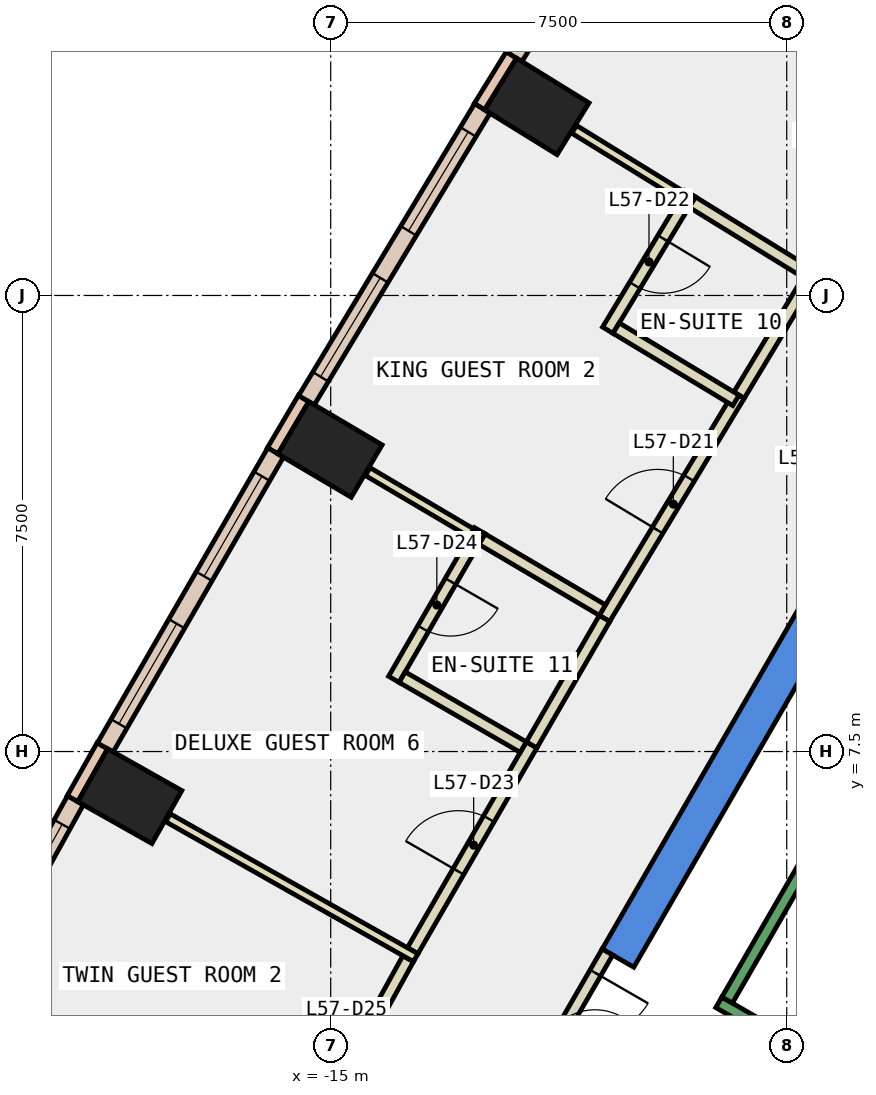
"""IFC4 building model, lengths in metres.
Left out: names, types, materials, properties, quantities, classifications, styles, units other than length and angle.
Written with IfcOpenShell. Run it as: python <this file> out.ifc"""

import sys

from ifc_helpers import new_model, si_unit, direction, frame, frame_2d, origin, origin_2d, place, context, subcontext, project, spatial, polyline, rectangle, outline, extrude, element, fill, save


model = new_model("IFC4")
c1 = context("Model", 3, precision=1e-05, world=origin(), true_north=direction((0.0, 1.0)))
c2 = subcontext(c1, "Body", "Model", "MODEL_VIEW")
j1 = project(units=[si_unit("LENGTHUNIT", "METRE"), si_unit("PLANEANGLEUNIT", "RADIAN")], contexts=[c1])
p1 = place(None, origin())
s1 = spatial("IfcSite", under=j1, at=p1, CompositionType="ELEMENT")
p2 = place(p1, origin())
s2 = spatial("IfcBuilding", under=s1, at=p2, CompositionType="ELEMENT")
p3 = place(p2, frame((0.0, 0.0, 252.2)))
s3 = spatial("IfcBuildingStorey", under=s2, at=p3, CompositionType="ELEMENT", Elevation=252.2)
for number, where, z_axis, x_axis in (
    (1, (-11.61, 18.109, -0.34), (0.0, 0.0, 1.0), (0.526, 0.851, 0.0)),
    (2, (-15.011, 12.468, -0.34), (0.0, 0.0, 1.0), (0.509, 0.861, 0.0)),
    (3, (-18.304, 6.766, -0.34), (0.0, 0.0, 1.0), (0.491, 0.871, 0.0)),
):
    element("IfcColumn", number, at=place(p3, frame(where, z_axis=z_axis, x_axis=x_axis)), inside=s3, PredefinedType="COLUMN", context=c2, shape_type="SweptSolid", body=[
        extrude(rectangle(XDim=1.0, YDim=1.4, at=origin_2d()), origin(), (0.0, 0.0, 1.0), 3.6),
    ])
p4 = place(p3, frame((0.0, 0.0, -0.34)))
e4 = element("IfcWall", 4, at=p4, inside=s3, PredefinedType="SHEAR", context=c2, shape_type="SweptSolid", body=[
    extrude(outline(polyline([(-10.535, 4.253), (-10.015, 3.953), (-5.427, 11.9), (-5.774, 12.5), (-10.535, 4.253)])), origin(), (0.0, 0.0, 1.0), 3.6),
])
p5 = place(p3, frame((-12.028, 18.955, 0.0), z_axis=(0.0, 0.0, 1.0), x_axis=(-0.525648735675, -0.850701714282, 0.0)))
e5 = element("IfcWall", 5, at=p5, inside=s3, PredefinedType="STANDARD", context=c2, shape_type="SweptSolid", body=[
    extrude(rectangle(XDim=1.0, YDim=0.2, at=frame_2d((0.5, 0.0))), origin(), (0.0, 0.0, 1.0), 3.26),
])
p6 = place(p3, frame((-15.446, 13.306, 0.0), z_axis=(0.0, 0.0, 1.0), x_axis=(-0.508268432768, -0.861198699634, 0.0)))
e6 = element("IfcWall", 6, at=p6, inside=s3, PredefinedType="STANDARD", context=c2, shape_type="SweptSolid", body=[
    extrude(rectangle(XDim=1.0, YDim=0.2, at=frame_2d((0.5, 0.0))), origin(), (0.0, 0.0, 1.0), 3.26),
])
p7 = place(p3, frame((-18.755, 7.594, 0.0), z_axis=(0.0, 0.0, 1.0), x_axis=(-0.491928603027, -0.870635543453, 0.0)))
e7 = element("IfcWall", 7, at=p7, inside=s3, PredefinedType="STANDARD", context=c2, shape_type="SweptSolid", body=[
    extrude(rectangle(XDim=1.0, YDim=0.2, at=frame_2d((0.5, 0.0))), origin(), (0.0, 0.0, 1.0), 3.26),
])
p8 = place(p3, frame((-8.981, 23.697, 0.0), z_axis=(0.0, 0.0, 1.0), x_axis=(-0.532558226688, -0.846393369059, 0.0)))
e8 = element("IfcWall", 8, at=p8, inside=s3, PredefinedType="STANDARD", context=c2, shape_type="SweptSolid", body=[
    extrude(rectangle(XDim=5.637, YDim=0.3, at=frame_2d((2.818, 0.0))), origin(), (0.0, 0.0, 1.0), 3.26),
])
p9 = place(p8, frame((0.459, 0.0, 0.9)))
e9 = element("IfcOpeningElement", 9, at=p9, cuts=e8, PredefinedType="OPENING", context=c2, shape_type="SweptSolid", body=[
    extrude(rectangle(XDim=1.9, YDim=2.0, at=frame_2d((0.95, 1.0))), frame((0.0, 0.16, 0.0), z_axis=(0.0, -1.0, 0.0), x_axis=(1.0, 0.0, 0.0)), (0.0, 0.0, 1.0), 0.32),
])
p10 = place(p8, frame((3.278, 0.0, 0.9)))
e10 = element("IfcOpeningElement", 10, at=p10, cuts=e8, PredefinedType="OPENING", context=c2, shape_type="SweptSolid", body=[
    extrude(rectangle(XDim=1.9, YDim=2.0, at=frame_2d((0.95, 1.0))), frame((0.0, 0.16, 0.0), z_axis=(0.0, -1.0, 0.0), x_axis=(1.0, 0.0, 0.0)), (0.0, 0.0, 1.0), 0.32),
])
p11 = place(p3, frame((-12.506, 18.076, 0.0), z_axis=(0.0, 0.0, 1.0), x_axis=(-0.516269519619, -0.856426169096, 0.0)))
e11 = element("IfcWall", 11, at=p11, inside=s3, PredefinedType="STANDARD", context=c2, shape_type="SweptSolid", body=[
    extrude(rectangle(XDim=5.603, YDim=0.3, at=frame_2d((2.802, 0.0))), origin(), (0.0, 0.0, 1.0), 3.26),
])
p12 = place(p11, frame((0.451, 0.0, 0.9)))
e12 = element("IfcOpeningElement", 12, at=p12, cuts=e11, PredefinedType="OPENING", context=c2, shape_type="SweptSolid", body=[
    extrude(rectangle(XDim=1.9, YDim=2.0, at=frame_2d((0.95, 1.0))), frame((0.0, 0.16, 0.0), z_axis=(0.0, -1.0, 0.0), x_axis=(1.0, 0.0, 0.0)), (0.0, 0.0, 1.0), 0.32),
])
p13 = place(p11, frame((3.253, 0.0, 0.9)))
e13 = element("IfcOpeningElement", 13, at=p13, cuts=e11, PredefinedType="OPENING", context=c2, shape_type="SweptSolid", body=[
    extrude(rectangle(XDim=1.9, YDim=2.0, at=frame_2d((0.95, 1.0))), frame((0.0, 0.16, 0.0), z_axis=(0.0, -1.0, 0.0), x_axis=(1.0, 0.0, 0.0)), (0.0, 0.0, 1.0), 0.32),
])
p14 = place(p3, frame((-15.906, 12.418, 0.0), z_axis=(0.0, 0.0, 1.0), x_axis=(-0.500089564757, -0.865973687372, 0.0)))
e14 = element("IfcWall", 14, at=p14, inside=s3, PredefinedType="STANDARD", context=c2, shape_type="SweptSolid", body=[
    extrude(rectangle(XDim=5.603, YDim=0.3, at=frame_2d((2.802, 0.0))), origin(), (0.0, 0.0, 1.0), 3.26),
])
p15 = place(p14, frame((0.451, 0.0, 0.9)))
e15 = element("IfcOpeningElement", 15, at=p15, cuts=e14, PredefinedType="OPENING", context=c2, shape_type="SweptSolid", body=[
    extrude(rectangle(XDim=1.9, YDim=2.0, at=frame_2d((0.95, 1.0))), frame((0.0, 0.16, 0.0), z_axis=(0.0, -1.0, 0.0), x_axis=(1.0, 0.0, 0.0)), (0.0, 0.0, 1.0), 0.32),
])
p16 = place(p14, frame((3.252, 0.0, 0.9)))
e16 = element("IfcOpeningElement", 16, at=p16, cuts=e14, PredefinedType="OPENING", context=c2, shape_type="SweptSolid", body=[
    extrude(rectangle(XDim=1.9, YDim=2.0, at=frame_2d((0.95, 1.0))), frame((0.0, 0.16, 0.0), z_axis=(0.0, -1.0, 0.0), x_axis=(1.0, 0.0, 0.0)), (0.0, 0.0, 1.0), 0.32),
])
p17 = place(p3, frame((-19.199, 6.697, 0.0), z_axis=(0.0, 0.0, 1.0), x_axis=(-0.483469062695, -0.875361448441, 0.0)))
e17 = element("IfcWall", 17, at=p17, inside=s3, PredefinedType="STANDARD", context=c2, shape_type="SweptSolid", body=[
    extrude(rectangle(XDim=5.601, YDim=0.3, at=frame_2d((2.801, 0.0))), origin(), (0.0, 0.0, 1.0), 3.26),
])
p18 = place(p17, frame((0.45, 0.0, 0.9)))
e18 = element("IfcOpeningElement", 18, at=p18, cuts=e17, PredefinedType="OPENING", context=c2, shape_type="SweptSolid", body=[
    extrude(rectangle(XDim=1.9, YDim=2.0, at=frame_2d((0.95, 1.0))), frame((0.0, 0.16, 0.0), z_axis=(0.0, -1.0, 0.0), x_axis=(1.0, 0.0, 0.0)), (0.0, 0.0, 1.0), 0.32),
])
p19 = place(p17, frame((3.251, 0.0, 0.9)))
e19 = element("IfcOpeningElement", 19, at=p19, cuts=e17, PredefinedType="OPENING", context=c2, shape_type="SweptSolid", body=[
    extrude(rectangle(XDim=1.9, YDim=2.0, at=frame_2d((0.95, 1.0))), frame((0.0, 0.16, 0.0), z_axis=(0.0, -1.0, 0.0), x_axis=(1.0, 0.0, 0.0)), (0.0, 0.0, 1.0), 0.32),
])
p20 = place(p3, frame((-10.498, 9.689, 0.0), z_axis=(0.0, 0.0, 1.0), x_axis=(0.516353342298, 0.856375633643, 0.0)))
e20 = element("IfcWall", 20, at=p20, inside=s3, PredefinedType="PARTITIONING", context=c2, shape_type="SweptSolid", body=[
    extrude(rectangle(XDim=4.288, YDim=0.2, at=frame_2d((2.144, 0.0))), origin(), (0.0, 0.0, 1.0), 3.26),
])
p21 = place(p20, frame((1.694, 0.0, 0.0)))
e21 = element("IfcOpeningElement", 21, at=p21, cuts=e20, PredefinedType="OPENING", context=c2, shape_type="SweptSolid", body=[
    extrude(rectangle(XDim=1.0, YDim=2.1, at=frame_2d((0.5, 1.05))), frame((0.0, 0.11, 0.0), z_axis=(0.0, -1.0, 0.0), x_axis=(1.0, 0.0, 0.0)), (0.0, 0.0, 1.0), 0.22),
])
p22 = place(p3, frame((-8.284, 13.361, 0.0), z_axis=(0.0, 0.0, 1.0), x_axis=(0.516354965559, 0.856374654893, 0.0)))
e22 = element("IfcWall", 22, at=p22, inside=s3, PredefinedType="PARTITIONING", context=c2, shape_type="SweptSolid", body=[
    extrude(rectangle(XDim=2.2, YDim=0.2, at=frame_2d((1.1, 0.0))), origin(), (0.0, 0.0, 1.0), 3.26),
])
p23 = place(p3, frame((-13.652, 4.224, 0.0), z_axis=(0.0, 0.0, 1.0), x_axis=(0.500221427001, 0.865897525097, 0.0)))
e23 = element("IfcWall", 23, at=p23, inside=s3, PredefinedType="PARTITIONING", context=c2, shape_type="SweptSolid", body=[
    extrude(rectangle(XDim=3.91, YDim=0.2, at=frame_2d((1.955, 0.0))), origin(), (0.0, 0.0, 1.0), 3.26),
])
p24 = place(p23, frame((1.505, 0.0, 0.0)))
e24 = element("IfcOpeningElement", 24, at=p24, cuts=e23, PredefinedType="OPENING", context=c2, shape_type="SweptSolid", body=[
    extrude(rectangle(XDim=1.0, YDim=2.1, at=frame_2d((0.5, 1.05))), frame((0.0, 0.11, 0.0), z_axis=(0.0, -1.0, 0.0), x_axis=(1.0, 0.0, 0.0)), (0.0, 0.0, 1.0), 0.22),
])
p25 = place(p3, frame((-11.696, 7.61, 0.0), z_axis=(0.0, 0.0, 1.0), x_axis=(0.500089422704, 0.865973769406, 0.0)))
e25 = element("IfcWall", 25, at=p25, inside=s3, PredefinedType="PARTITIONING", context=c2, shape_type="SweptSolid", body=[
    extrude(rectangle(XDim=2.399, YDim=0.2, at=frame_2d((1.2, 0.0))), origin(), (0.0, 0.0, 1.0), 3.26),
])
p26 = place(p3, frame((-15.809, 0.32, 0.0), z_axis=(0.0, 0.0, 1.0), x_axis=(0.483322920175, 0.875442148193, 0.0)))
e26 = element("IfcWall", 26, at=p26, inside=s3, PredefinedType="PARTITIONING", context=c2, shape_type="SweptSolid", body=[
    extrude(rectangle(XDim=4.31, YDim=0.2, at=frame_2d((2.155, 0.0))), origin(), (0.0, 0.0, 1.0), 3.26),
])
p27 = place(p26, frame((1.705, 0.0, 0.0)))
e27 = element("IfcOpeningElement", 27, at=p27, cuts=e26, PredefinedType="OPENING", context=c2, shape_type="SweptSolid", body=[
    extrude(rectangle(XDim=1.0, YDim=2.1, at=frame_2d((0.5, 1.05))), frame((0.0, 0.11, 0.0), z_axis=(0.0, -1.0, 0.0), x_axis=(1.0, 0.0, 0.0)), (0.0, 0.0, 1.0), 0.22),
])
p28 = place(p3, frame((-7.357, 19.423, 0.0), z_axis=(0.0, 0.0, 1.0), x_axis=(0.846270070045, -0.532754135176, 0.0)))
e28 = element("IfcWall", 28, at=p28, inside=s3, PredefinedType="PARTITIONING", context=c2, shape_type="SweptSolid", body=[
    extrude(rectangle(XDim=2.3, YDim=0.2, at=frame_2d((1.15, 0.0))), origin(), (0.0, 0.0, 1.0), 3.26),
])
p29 = place(p3, frame((-9.225, 16.641, 0.0), z_axis=(0.0, 0.0, 1.0), x_axis=(-0.85144868382, 0.524437926566, 0.0)))
e29 = element("IfcWall", 29, at=p29, inside=s3, PredefinedType="PARTITIONING", context=c2, shape_type="SweptSolid", body=[
    extrude(rectangle(XDim=2.08, YDim=0.15, at=frame_2d((1.04, 0.0))), origin(), (0.0, 0.0, 1.0), 3.26),
])
p30 = place(p3, frame((-7.182, 15.383, 0.0), z_axis=(0.0, 0.0, 1.0), x_axis=(-0.851498142432, 0.524357619792, 0.0)))
e30 = element("IfcWall", 30, at=p30, inside=s3, PredefinedType="PARTITIONING", context=c2, shape_type="SweptSolid", body=[
    extrude(rectangle(XDim=2.198, YDim=0.2, at=frame_2d((1.099, 0.0))), origin(), (0.0, 0.0, 1.0), 3.26),
])
p31 = place(p3, frame((-9.088, 16.674, 0.0), z_axis=(0.0, 0.0, 1.0), x_axis=(-0.516780274192, -0.856118069081, 0.0)))
e31 = element("IfcWall", 31, at=p31, inside=s3, PredefinedType="PARTITIONING", context=c2, shape_type="SweptSolid", body=[
    extrude(rectangle(XDim=2.623, YDim=0.2, at=frame_2d((1.311, 0.0))), origin(), (0.0, 0.0, 1.0), 3.26),
])
p32 = place(p31, frame((0.861, 0.0, 0.0)))
e32 = element("IfcOpeningElement", 32, at=p32, cuts=e31, PredefinedType="OPENING", context=c2, shape_type="SweptSolid", body=[
    extrude(rectangle(XDim=0.9, YDim=2.1, at=frame_2d((0.45, 1.05))), frame((0.0, 0.11, 0.0), z_axis=(0.0, -1.0, 0.0), x_axis=(1.0, 0.0, 0.0)), (0.0, 0.0, 1.0), 0.22),
])
p33 = place(p3, frame((-10.306, 14.463, 0.0), z_axis=(0.0, 0.0, 1.0), x_axis=(0.856338986581, -0.51641411683, 0.0)))
e33 = element("IfcWall", 33, at=p33, inside=s3, PredefinedType="PARTITIONING", context=c2, shape_type="SweptSolid", body=[
    extrude(rectangle(XDim=2.301, YDim=0.2, at=frame_2d((1.15, 0.0))), origin(), (0.0, 0.0, 1.0), 3.26),
])
p34 = place(p3, frame((-12.685, 11.096, 0.0), z_axis=(0.0, 0.0, 1.0), x_axis=(-0.861157054724, 0.508338988371, 0.0)))
e34 = element("IfcWall", 34, at=p34, inside=s3, PredefinedType="PARTITIONING", context=c2, shape_type="SweptSolid", body=[
    extrude(rectangle(XDim=1.981, YDim=0.15, at=frame_2d((0.991, 0.0))), origin(), (0.0, 0.0, 1.0), 3.26),
])
p35 = place(p3, frame((-10.532, 9.826, 0.0), z_axis=(0.0, 0.0, 1.0), x_axis=(-0.861311086958, 0.508077958077, 0.0)))
e35 = element("IfcWall", 35, at=p35, inside=s3, PredefinedType="PARTITIONING", context=c2, shape_type="SweptSolid", body=[
    extrude(rectangle(XDim=2.299, YDim=0.2, at=frame_2d((1.149, 0.0))), origin(), (0.0, 0.0, 1.0), 3.26),
])
p36 = place(p3, frame((-12.548, 11.132, 0.0), z_axis=(0.0, 0.0, 1.0), x_axis=(-0.500313606915, -0.865844267022, 0.0)))
e36 = element("IfcWall", 36, at=p36, inside=s3, PredefinedType="PARTITIONING", context=c2, shape_type="SweptSolid", body=[
    extrude(rectangle(XDim=2.824, YDim=0.2, at=frame_2d((1.412, 0.0))), origin(), (0.0, 0.0, 1.0), 3.26),
])
p37 = place(p36, frame((0.962, 0.0, 0.0)))
e37 = element("IfcOpeningElement", 37, at=p37, cuts=e36, PredefinedType="OPENING", context=c2, shape_type="SweptSolid", body=[
    extrude(rectangle(XDim=0.9, YDim=2.1, at=frame_2d((0.45, 1.05))), frame((0.0, 0.11, 0.0), z_axis=(0.0, -1.0, 0.0), x_axis=(1.0, 0.0, 0.0)), (0.0, 0.0, 1.0), 0.22),
])
p38 = place(p3, frame((-13.825, 8.723, 0.0), z_axis=(0.0, 0.0, 1.0), x_axis=(0.866053019151, -0.499952165731, 0.0)))
e38 = element("IfcWall", 38, at=p38, inside=s3, PredefinedType="PARTITIONING", context=c2, shape_type="SweptSolid", body=[
    extrude(rectangle(XDim=2.3, YDim=0.2, at=frame_2d((1.15, 0.0))), origin(), (0.0, 0.0, 1.0), 3.26),
])
p39 = place(p3, frame((-13.602, 4.11, 0.0), z_axis=(0.0, 0.0, 1.0), x_axis=(-0.870787203306, 0.491660092502, 0.0)))
e39 = element("IfcWall", 39, at=p39, inside=s3, PredefinedType="PARTITIONING", context=c2, shape_type="SweptSolid", body=[
    extrude(rectangle(XDim=4.68, YDim=0.15, at=frame_2d((2.34, 0.0))), origin(), (0.0, 0.0, 1.0), 3.26),
])
p40 = place(p3, frame((-10.449, 4.203, 0.0), z_axis=(0.0, 0.0, 1.0), x_axis=(-0.499914839587, -0.866074565589, 0.0)))
e40 = element("IfcWall", 40, at=p40, inside=s3, PredefinedType="PARTITIONING", context=c2, shape_type="SweptSolid", body=[
    extrude(rectangle(XDim=1.794, YDim=0.2, at=frame_2d((0.897, 0.0))), origin(), (0.0, 0.0, 1.0), 2.4),
])
p41 = place(p40, frame((0.397, 0.0, 0.0)))
e41 = element("IfcOpeningElement", 41, at=p41, cuts=e40, PredefinedType="OPENING", context=c2, shape_type="SweptSolid", body=[
    extrude(rectangle(XDim=1.0, YDim=2.1, at=frame_2d((0.5, 1.05))), frame((0.0, 0.11, 0.0), z_axis=(0.0, -1.0, 0.0), x_axis=(1.0, 0.0, 0.0)), (0.0, 0.0, 1.0), 0.22),
])
p42 = place(p3, frame((-6.25, 2.01, 0.0), z_axis=(0.0, 0.0, 1.0), x_axis=(-0.86611865017, 0.499838457731, 0.0)))
e42 = element("IfcWall", 42, at=p42, inside=s3, PredefinedType="STANDARD", context=c2, shape_type="SweptSolid", body=[
    extrude(rectangle(XDim=2.733, YDim=0.2, at=frame_2d((1.366, 0.0))), origin(), (0.0, 0.0, 1.0), 3.26),
])
p43 = place(p3, frame((-5.03, 9.388, 0.0), z_axis=(0.0, 0.0, 1.0), x_axis=(-0.499978703459, -0.866037698999, 0.0)))
e43 = element("IfcWall", 43, at=p43, inside=s3, PredefinedType="STANDARD", context=c2, shape_type="SweptSolid", body=[
    extrude(rectangle(XDim=6.9, YDim=0.2, at=frame_2d((3.45, 0.0))), origin(), (0.0, 0.0, 1.0), 3.26),
])
p44 = place(p12, origin())
e44 = element("IfcWindow", 44, at=p44, inside=s3, PartitioningType="SINGLE_PANEL", PredefinedType="WINDOW", context=c2, shape_type="SweptSolid", body=[
    extrude(rectangle(XDim=1.9, YDim=2.0, at=frame_2d((0.95, 1.0))), frame((0.0, 0.03, 0.0), z_axis=(0.0, -1.0, 0.0), x_axis=(1.0, 0.0, 0.0)), (0.0, 0.0, 1.0), 0.06),
])
fill(e12, e44)
p45 = place(p13, origin())
e45 = element("IfcWindow", 45, at=p45, inside=s3, PartitioningType="SINGLE_PANEL", PredefinedType="WINDOW", context=c2, shape_type="SweptSolid", body=[
    extrude(rectangle(XDim=1.9, YDim=2.0, at=frame_2d((0.95, 1.0))), frame((0.0, 0.03, 0.0), z_axis=(0.0, -1.0, 0.0), x_axis=(1.0, 0.0, 0.0)), (0.0, 0.0, 1.0), 0.06),
])
fill(e13, e45)
p46 = place(p15, origin())
e46 = element("IfcWindow", 46, at=p46, inside=s3, PartitioningType="SINGLE_PANEL", PredefinedType="WINDOW", context=c2, shape_type="SweptSolid", body=[
    extrude(rectangle(XDim=1.9, YDim=2.0, at=frame_2d((0.95, 1.0))), frame((0.0, 0.03, 0.0), z_axis=(0.0, -1.0, 0.0), x_axis=(1.0, 0.0, 0.0)), (0.0, 0.0, 1.0), 0.06),
])
fill(e15, e46)
p47 = place(p16, origin())
e47 = element("IfcWindow", 47, at=p47, inside=s3, PartitioningType="SINGLE_PANEL", PredefinedType="WINDOW", context=c2, shape_type="SweptSolid", body=[
    extrude(rectangle(XDim=1.9, YDim=2.0, at=frame_2d((0.95, 1.0))), frame((0.0, 0.03, 0.0), z_axis=(0.0, -1.0, 0.0), x_axis=(1.0, 0.0, 0.0)), (0.0, 0.0, 1.0), 0.06),
])
fill(e16, e47)
p48 = place(p18, origin())
e48 = element("IfcWindow", 48, at=p48, inside=s3, PartitioningType="SINGLE_PANEL", PredefinedType="WINDOW", context=c2, shape_type="SweptSolid", body=[
    extrude(rectangle(XDim=1.9, YDim=2.0, at=frame_2d((0.95, 1.0))), frame((0.0, 0.03, 0.0), z_axis=(0.0, -1.0, 0.0), x_axis=(1.0, 0.0, 0.0)), (0.0, 0.0, 1.0), 0.06),
])
fill(e18, e48)
p49 = place(p21, origin())
e49 = element("IfcDoor", 49, at=p49, inside=s3, OperationType="SINGLE_SWING_RIGHT", PredefinedType="DOOR", context=c2, shape_type="SweptSolid", body=[
    extrude(rectangle(XDim=1.0, YDim=2.1, at=frame_2d((0.5, 1.05))), frame((0.0, 0.025, 0.0), z_axis=(0.0, -1.0, 0.0), x_axis=(1.0, 0.0, 0.0)), (0.0, 0.0, 1.0), 0.05),
])
fill(e21, e49)
p50 = place(p32, origin())
e50 = element("IfcDoor", 50, at=p50, inside=s3, OperationType="SINGLE_SWING_LEFT", PredefinedType="DOOR", context=c2, shape_type="SweptSolid", body=[
    extrude(rectangle(XDim=0.9, YDim=2.1, at=frame_2d((0.45, 1.05))), frame((0.0, 0.025, 0.0), z_axis=(0.0, -1.0, 0.0), x_axis=(1.0, 0.0, 0.0)), (0.0, 0.0, 1.0), 0.05),
])
fill(e32, e50)
p51 = place(p24, origin())
e51 = element("IfcDoor", 51, at=p51, inside=s3, OperationType="SINGLE_SWING_RIGHT", PredefinedType="DOOR", context=c2, shape_type="SweptSolid", body=[
    extrude(rectangle(XDim=1.0, YDim=2.1, at=frame_2d((0.5, 1.05))), frame((0.0, 0.025, 0.0), z_axis=(0.0, -1.0, 0.0), x_axis=(1.0, 0.0, 0.0)), (0.0, 0.0, 1.0), 0.05),
])
fill(e24, e51)
p52 = place(p37, origin())
e52 = element("IfcDoor", 52, at=p52, inside=s3, OperationType="SINGLE_SWING_LEFT", PredefinedType="DOOR", context=c2, shape_type="SweptSolid", body=[
    extrude(rectangle(XDim=0.9, YDim=2.1, at=frame_2d((0.45, 1.05))), frame((0.0, 0.025, 0.0), z_axis=(0.0, -1.0, 0.0), x_axis=(1.0, 0.0, 0.0)), (0.0, 0.0, 1.0), 0.05),
])
fill(e37, e52)
p53 = place(p41, origin())
e53 = element("IfcDoor", 53, at=p53, inside=s3, OperationType="SINGLE_SWING_LEFT", PredefinedType="DOOR", context=c2, shape_type="SweptSolid", body=[
    extrude(rectangle(XDim=1.0, YDim=2.1, at=frame_2d((0.5, 1.05))), frame((0.0, 0.025, 0.0), z_axis=(0.0, -1.0, 0.0), x_axis=(1.0, 0.0, 0.0)), (0.0, 0.0, 1.0), 0.05),
])
fill(e41, e53)
save(model, sys.argv[1])
